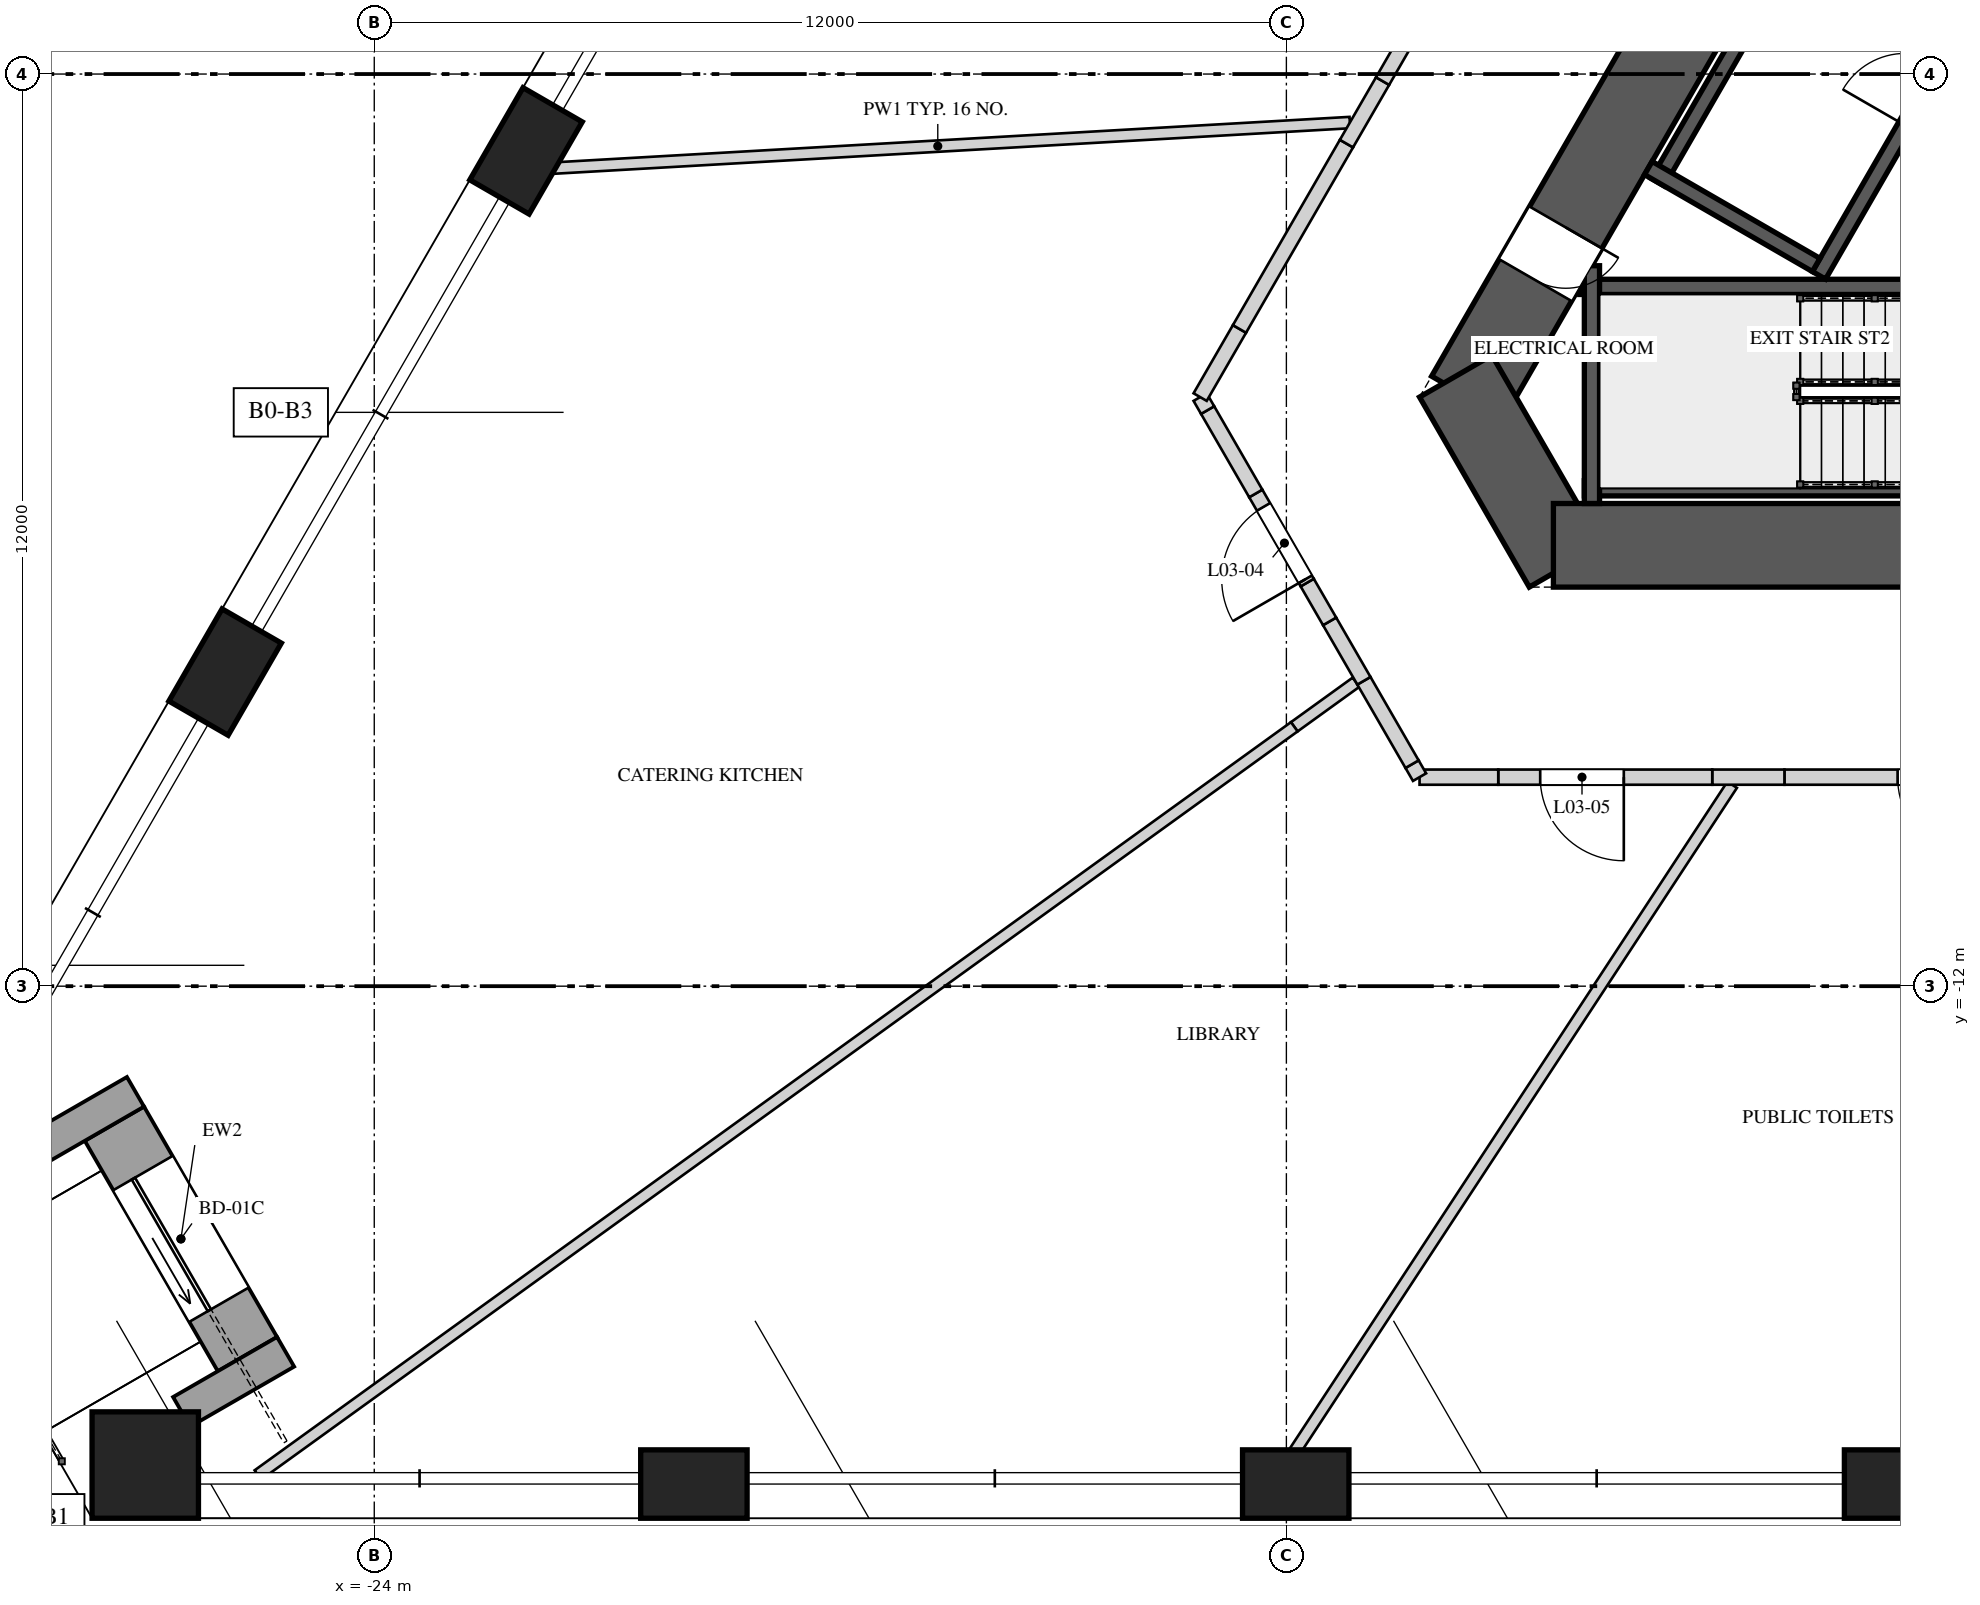
"""IFC4 building model, lengths in metres.
Left out: names, types, materials, properties, quantities, classifications, styles, units other than length and angle.
Written with IfcOpenShell. Run it as: python <this file> out.ifc"""

import sys

from ifc_helpers import new_model, si_unit, direction, frame, frame_2d, origin, origin_2d, place, context, subcontext, project, spatial, polyline, rectangle, outline, extrude, element, fill, save


model = new_model("IFC4")
c1 = context("Model", 3, precision=1e-05, world=origin(), true_north=direction((0.0, 1.0)))
c2 = subcontext(c1, "Body", "Model", "MODEL_VIEW")
j1 = project(units=[si_unit("LENGTHUNIT", "METRE"), si_unit("PLANEANGLEUNIT", "RADIAN")], contexts=[c1])
p1 = place(None, origin())
s1 = spatial("IfcSite", under=j1, at=p1, CompositionType="ELEMENT")
p2 = place(p1, origin())
s2 = spatial("IfcBuilding", under=s1, at=p2, CompositionType="ELEMENT")
p3 = place(p2, frame((0.0, 0.0, 20.0)))
s3 = spatial("IfcBuildingStorey", under=s2, at=p3, CompositionType="ELEMENT", Elevation=20.0)
p4 = place(p3, frame((-1.126, 10.45, 0.0), z_axis=(0.0, 0.0, 1.0), x_axis=(-0.500001757713, -0.866024388966, 0.0)))
e1 = element("IfcWall", 1, at=p4, inside=s3, PredefinedType="SHEAR", context=c2, shape_type="SweptSolid", body=[
    extrude(rectangle(XDim=16.974, YDim=1.1, at=frame_2d((8.487, 0.0))), origin(), (0.0, 0.0, 1.0), 5.0),
])
p5 = place(p4, frame((6.692, 0.0, 0.0)))
e2 = element("IfcOpeningElement", 2, at=p5, cuts=e1, PredefinedType="OPENING", context=c2, shape_type="SweptSolid", body=[
    extrude(rectangle(XDim=1.0, YDim=2.4, at=frame_2d((0.5, 1.2))), frame((0.0, 0.56, 0.0), z_axis=(0.0, -1.0, 0.0), x_axis=(1.0, 0.0, 0.0)), (0.0, 0.0, 1.0), 1.12),
])
p6 = place(p4, frame((14.397, 0.0, 0.0)))
e3 = element("IfcOpeningElement", 3, at=p6, cuts=e1, PredefinedType="OPENING", context=c2, shape_type="SweptSolid", body=[
    extrude(rectangle(XDim=0.8, YDim=2.1, at=frame_2d((0.4, 1.05))), frame((0.0, 0.56, 0.0), z_axis=(0.0, -1.0, 0.0), x_axis=(1.0, 0.0, 0.0)), (0.0, 0.0, 1.0), 1.12),
])
p7 = place(p3, frame((-9.772, -3.975, 0.0), z_axis=(0.0, 0.0, 1.0), x_axis=(0.499995765644, -0.866027848477, 0.0)))
e4 = element("IfcWall", 4, at=p7, inside=s3, PredefinedType="SHEAR", context=c2, shape_type="SweptSolid", body=[
    extrude(rectangle(XDim=2.887, YDim=1.1, at=frame_2d((1.443, 0.0))), origin(), (0.0, 0.0, 1.0), 5.0),
])
p8 = place(p3, frame((-8.487, -6.2, 0.0), z_axis=(0.0, 0.0, 1.0), x_axis=(1.0, 0.0, 0.0)))
e5 = element("IfcWall", 5, at=p8, inside=s3, PredefinedType="SHEAR", context=c2, shape_type="SweptSolid", body=[
    extrude(rectangle(XDim=16.974, YDim=1.1, at=frame_2d((8.487, 0.0))), origin(), (0.0, 0.0, 1.0), 5.0),
])
p9 = place(p8, frame((6.692, 0.0, 0.0)))
e6 = element("IfcOpeningElement", 6, at=p9, cuts=e5, PredefinedType="OPENING", context=c2, shape_type="SweptSolid", body=[
    extrude(rectangle(XDim=1.0, YDim=2.4, at=frame_2d((0.5, 1.2))), frame((0.0, 0.56, 0.0), z_axis=(0.0, -1.0, 0.0), x_axis=(1.0, 0.0, 0.0)), (0.0, 0.0, 1.0), 1.12),
])
for number, where, z_axis, x_axis in (
    (7, (-22.003, -1.011, 0.0), (0.0, 0.0, 1.0), (-0.5, -0.866, 0.0)),
    (8, (-25.962, -7.868, 0.0), (0.0, 0.0, 1.0), (-0.5, -0.866, 0.0)),
):
    element("IfcColumn", number, at=place(p3, frame(where, z_axis=z_axis, x_axis=x_axis)), inside=s3, PredefinedType="COLUMN", context=c2, shape_type="SweptSolid", body=[
        extrude(rectangle(XDim=1.4, YDim=0.9, at=origin_2d()), origin(), (0.0, 0.0, 1.0), 5.0),
    ])
p10 = place(p3, frame((-27.013, -18.3, 0.0), z_axis=(0.0, 0.0, 1.0), x_axis=(1.0, 0.0, 0.0)))
e9 = element("IfcColumn", 9, at=p10, inside=s3, PredefinedType="COLUMN", context=c2, shape_type="SweptSolid", body=[
    extrude(rectangle(XDim=1.4, YDim=1.4, at=origin_2d()), origin(), (0.0, 0.0, 1.0), 5.0),
])
for number, where, z_axis, x_axis in (
    (10, (-19.795, -18.55, 0.0), (0.0, 0.0, 1.0), (1.0, 0.0, 0.0)),
    (11, (-11.877, -18.55, 0.0), (0.0, 0.0, 1.0), (1.0, 0.0, 0.0)),
    (12, (-3.959, -18.55, 0.0), (0.0, 0.0, 1.0), (1.0, 0.0, 0.0)),
):
    element("IfcColumn", number, at=place(p3, frame(where, z_axis=z_axis, x_axis=x_axis)), inside=s3, PredefinedType="COLUMN", context=c2, shape_type="SweptSolid", body=[
        extrude(rectangle(XDim=1.4, YDim=0.9, at=origin_2d()), origin(), (0.0, 0.0, 1.0), 5.0),
    ])
p11 = place(p3, frame((-25.669, -16.841, 0.0), z_axis=(0.0, 0.0, 1.0), x_axis=(-0.500010275428, 0.866019471182, 0.0)))
e13 = element("IfcWall", 13, at=p11, inside=s3, PredefinedType="SOLIDWALL", context=c2, shape_type="SweptSolid", body=[
    extrude(rectangle(XDim=3.5, YDim=0.9, at=frame_2d((1.75, 0.0))), origin(), (0.0, 0.0, 1.0), 4.3),
])
p12 = place(p11, frame((0.75, 0.0, 0.0)))
e14 = element("IfcOpeningElement", 14, at=p12, cuts=e13, PredefinedType="OPENING", context=c2, shape_type="SweptSolid", body=[
    extrude(rectangle(XDim=2.0, YDim=2.4, at=frame_2d((1.0, 1.2))), frame((0.0, 0.46, 0.0), z_axis=(0.0, -1.0, 0.0), x_axis=(1.0, 0.0, 0.0)), (0.0, 0.0, 1.0), 0.92),
])
p13 = place(p3, frame((-26.534, -17.6, 0.0), z_axis=(0.0, 0.0, 1.0), x_axis=(0.86597962928, 0.500079275387, 0.0)))
e15 = element("IfcWall", 15, at=p13, inside=s3, PredefinedType="SOLIDWALL", context=c2, shape_type="SweptSolid", body=[
    extrude(rectangle(XDim=1.579, YDim=0.45, at=frame_2d((0.79, 0.0))), origin(), (0.0, 0.0, 1.0), 2.55),
])
p14 = place(p3, frame((-28.509, -14.179, 0.0), z_axis=(0.0, 0.0, 1.0), x_axis=(0.866046570609, 0.499963336192, 0.0)))
e16 = element("IfcWall", 16, at=p14, inside=s3, PredefinedType="SOLIDWALL", context=c2, shape_type="SweptSolid", body=[
    extrude(rectangle(XDim=1.579, YDim=0.45, at=frame_2d((0.79, 0.0))), origin(), (0.0, 0.0, 1.0), 2.55),
])
p15 = place(p3, frame((-8.08, -5.45, 0.0), z_axis=(0.0, 0.0, 1.0), x_axis=(1.0, 0.0, 0.0)))
e17 = element("IfcWall", 17, at=p15, inside=s3, PredefinedType="SOLIDWALL", context=c2, shape_type="SweptSolid", body=[
    extrude(rectangle(XDim=6.2, YDim=0.2, at=frame_2d((3.1, 0.0))), origin(), (0.0, 0.0, 1.0), 4.65),
])
p16 = place(p3, frame((-8.141, -2.8, 0.0), z_axis=(0.0, 0.0, 1.0), x_axis=(1.0, 0.0, 0.0)))
e18 = element("IfcWall", 18, at=p16, inside=s3, PredefinedType="SOLIDWALL", context=c2, shape_type="SweptSolid", body=[
    extrude(rectangle(XDim=6.261, YDim=0.2, at=frame_2d((3.13, 0.0))), origin(), (0.0, 0.0, 1.0), 4.65),
])
p17 = place(p3, frame((-7.98, -2.522, 0.0), z_axis=(0.0, 0.0, 1.0), x_axis=(0.0, -1.0, 0.0)))
e19 = element("IfcWall", 19, at=p17, inside=s3, PredefinedType="SOLIDWALL", context=c2, shape_type="SweptSolid", body=[
    extrude(rectangle(XDim=3.128, YDim=0.2, at=frame_2d((1.564, 0.0))), origin(), (0.0, 0.0, 1.0), 4.65),
])
p18 = place(p3, frame((-4.993, -2.648, 0.0), z_axis=(0.0, 0.0, 1.0), x_axis=(0.499996545922, 0.866027397988, 0.0)))
e20 = element("IfcWall", 20, at=p18, inside=s3, PredefinedType="SOLIDWALL", context=c2, shape_type="SweptSolid", body=[
    extrude(rectangle(XDim=5.5, YDim=0.2, at=frame_2d((2.75, 0.0))), origin(), (0.0, 0.0, 1.0), 4.65),
])
p19 = place(p18, frame((2.275, 0.0, 0.0)))
e21 = element("IfcOpeningElement", 21, at=p19, cuts=e20, PredefinedType="OPENING", context=c2, shape_type="SweptSolid", body=[
    extrude(rectangle(XDim=0.95, YDim=2.4, at=frame_2d((0.475, 1.2))), frame((0.0, 0.11, 0.0), z_axis=(0.0, -1.0, 0.0), x_axis=(1.0, 0.0, 0.0)), (0.0, 0.0, 1.0), 0.22),
])
p20 = place(p3, frame((-4.365, 3.34, 0.0), z_axis=(0.0, 0.0, 1.0), x_axis=(-0.499996545922, -0.866027397988, 0.0)))
e22 = element("IfcWall", 22, at=p20, inside=s3, PredefinedType="SOLIDWALL", context=c2, shape_type="SweptSolid", body=[
    extrude(rectangle(XDim=5.5, YDim=0.2, at=frame_2d((2.75, 0.0))), origin(), (0.0, 0.0, 1.0), 4.65),
])
p21 = place(p3, frame((-5.03, -2.512, 0.0), z_axis=(0.0, 0.0, 1.0), x_axis=(-0.865989465428, 0.500062241894, 0.0)))
e23 = element("IfcWall", 23, at=p21, inside=s3, PredefinedType="SOLIDWALL", context=c2, shape_type="SweptSolid", body=[
    extrude(rectangle(XDim=2.55, YDim=0.2, at=frame_2d((1.275, 0.0))), origin(), (0.0, 0.0, 1.0), 4.65),
])
p22 = place(p3, frame((-11.165, -0.638, 0.0), z_axis=(0.0, 0.0, 1.0), x_axis=(-0.998369760977, -0.057077319203, 0.0)))
e24 = element("IfcWall", 24, at=p22, inside=s3, PredefinedType="PARTITIONING", context=c2, shape_type="SweptSolid", body=[
    extrude(rectangle(XDim=10.86, YDim=0.15, at=frame_2d((5.43, 0.0))), origin(), (0.0, 0.0, 1.0), 3.75),
])
p23 = place(p3, frame((-11.084, -8.001, 0.0), z_axis=(0.0, 0.0, 1.0), x_axis=(-0.810724232581, -0.585428235316, 0.0)))
e25 = element("IfcWall", 25, at=p23, inside=s3, PredefinedType="PARTITIONING", context=c2, shape_type="SweptSolid", body=[
    extrude(rectangle(XDim=1.001, YDim=0.15, at=frame_2d((0.5, 0.0))), origin(), (0.0, 0.0, 1.0), 3.55),
])
p24 = place(p3, frame((-11.896, -8.588, 0.0), z_axis=(0.0, 0.0, 1.0), x_axis=(-0.810816646236, -0.585300235936, 0.0)))
e26 = element("IfcWall", 26, at=p24, inside=s3, PredefinedType="PARTITIONING", context=c2, shape_type="SweptSolid", body=[
    extrude(rectangle(XDim=16.816, YDim=0.15, at=frame_2d((8.408, 0.0))), origin(), (0.0, 0.0, 1.0), 4.65),
])
p25 = place(p3, frame((-6.135, -9.35, 0.0), z_axis=(0.0, 0.0, 1.0), x_axis=(-0.548631398355, -0.836064344856, 0.0)))
e27 = element("IfcWall", 27, at=p25, inside=s3, PredefinedType="PARTITIONING", context=c2, shape_type="SweptSolid", body=[
    extrude(rectangle(XDim=10.86, YDim=0.15, at=frame_2d((5.43, 0.0))), origin(), (0.0, 0.0, 1.0), 3.75),
])
p26 = place(p3, frame((-2.383, -9.25, 0.0), z_axis=(0.0, 0.0, 1.0), x_axis=(-1.0, 0.0, 0.0)))
e28 = element("IfcWall", 28, at=p26, inside=s3, PredefinedType="SOLIDWALL", context=c2, shape_type="SweptSolid", body=[
    extrude(rectangle(XDim=3.064, YDim=0.2, at=frame_2d((1.532, 0.0))), origin(), (0.0, 0.0, 1.0), 4.65),
])
p27 = place(p26, frame((0.475, 0.0, 0.0)))
e29 = element("IfcOpeningElement", 29, at=p27, cuts=e28, PredefinedType="OPENING", context=c2, shape_type="SweptSolid", body=[
    extrude(rectangle(XDim=1.1, YDim=2.4, at=frame_2d((0.55, 1.2))), frame((0.0, 0.11, 0.0), z_axis=(0.0, -1.0, 0.0), x_axis=(1.0, 0.0, 0.0)), (0.0, 0.0, 1.0), 0.22),
])
p28 = place(p3, frame((-5.448, -9.25, 0.0), z_axis=(0.0, 0.0, 1.0), x_axis=(-1.0, 0.0, 0.0)))
e30 = element("IfcWall", 30, at=p28, inside=s3, PredefinedType="SOLIDWALL", context=c2, shape_type="SweptSolid", body=[
    extrude(rectangle(XDim=0.95, YDim=0.2, at=frame_2d((0.475, 0.0))), origin(), (0.0, 0.0, 1.0), 3.75),
])
p29 = place(p3, frame((-6.397, -9.25, 0.0), z_axis=(0.0, 0.0, 1.0), x_axis=(-1.0, 0.0, 0.0)))
e31 = element("IfcWall", 31, at=p29, inside=s3, PredefinedType="SOLIDWALL", context=c2, shape_type="SweptSolid", body=[
    extrude(rectangle(XDim=2.815, YDim=0.2, at=frame_2d((1.408, 0.0))), origin(), (0.0, 0.0, 1.0), 4.65),
])
p30 = place(p29, frame((1.163, 0.0, 0.0)))
e32 = element("IfcOpeningElement", 32, at=p30, cuts=e31, PredefinedType="OPENING", context=c2, shape_type="SweptSolid", body=[
    extrude(rectangle(XDim=1.1, YDim=2.4, at=frame_2d((0.55, 1.2))), frame((0.0, 0.11, 0.0), z_axis=(0.0, -1.0, 0.0), x_axis=(1.0, 0.0, 0.0)), (0.0, 0.0, 1.0), 0.22),
])
p31 = place(p3, frame((-9.213, -9.25, 0.0), z_axis=(0.0, 0.0, 1.0), x_axis=(-1.0, 0.0, 0.0)))
e33 = element("IfcWall", 33, at=p31, inside=s3, PredefinedType="SOLIDWALL", context=c2, shape_type="SweptSolid", body=[
    extrude(rectangle(XDim=1.035, YDim=0.2, at=frame_2d((0.518, 0.0))), origin(), (0.0, 0.0, 1.0), 3.55),
])
p32 = place(p3, frame((-10.248, -9.25, 0.0), z_axis=(0.0, 0.0, 1.0), x_axis=(-0.499865263774, 0.866103179807, 0.0)))
e34 = element("IfcWall", 34, at=p32, inside=s3, PredefinedType="SOLIDWALL", context=c2, shape_type="SweptSolid", body=[
    extrude(rectangle(XDim=0.197, YDim=0.2, at=frame_2d((0.099, 0.0))), origin(), (0.0, 0.0, 1.0), 3.55),
])
p33 = place(p3, frame((-10.347, -9.079, 0.0), z_axis=(0.0, 0.0, 1.0), x_axis=(-0.499911523785, 0.866076479525, 0.0)))
e35 = element("IfcWall", 35, at=p33, inside=s3, PredefinedType="SOLIDWALL", context=c2, shape_type="SweptSolid", body=[
    extrude(rectangle(XDim=1.267, YDim=0.2, at=frame_2d((0.633, 0.0))), origin(), (0.0, 0.0, 1.0), 4.65),
])
p34 = place(p3, frame((-10.98, -7.982, 0.0), z_axis=(0.0, 0.0, 1.0), x_axis=(-0.500097243556, 0.865969252911, 0.0)))
e36 = element("IfcWall", 36, at=p34, inside=s3, PredefinedType="SOLIDWALL", context=c2, shape_type="SweptSolid", body=[
    extrude(rectangle(XDim=0.902, YDim=0.2, at=frame_2d((0.451, 0.0))), origin(), (0.0, 0.0, 1.0), 3.55),
])
p35 = place(p3, frame((-11.431, -7.201, 0.0), z_axis=(0.0, 0.0, 1.0), x_axis=(-0.500105011351, 0.865964766963, 0.0)))
e37 = element("IfcWall", 37, at=p35, inside=s3, PredefinedType="SOLIDWALL", context=c2, shape_type="SweptSolid", body=[
    extrude(rectangle(XDim=0.589, YDim=0.2, at=frame_2d((0.294, 0.0))), origin(), (0.0, 0.0, 1.0), 4.65),
])
p36 = place(p3, frame((-11.726, -6.69, 0.0), z_axis=(0.0, 0.0, 1.0), x_axis=(-0.499941024108, 0.866059450854, 0.0)))
e38 = element("IfcWall", 38, at=p36, inside=s3, PredefinedType="SOLIDWALL", context=c2, shape_type="SweptSolid", body=[
    extrude(outline(polyline([(0.0, 0.0), (1.354, 0.0), (1.354, 3.55), (0.451, 3.55), (0.451, 4.65), (0.0, 4.65), (0.0, 0.0)])), frame((0.0, 0.1, 0.0), z_axis=(0.0, -1.0, 0.0), x_axis=(1.0, 0.0, 0.0)), (0.0, 0.0, 1.0), 0.2),
])
p37 = place(p36, frame((0.05, 0.0, 0.0)))
e39 = element("IfcOpeningElement", 39, at=p37, cuts=e38, PredefinedType="OPENING", context=c2, shape_type="SweptSolid", body=[
    extrude(rectangle(XDim=1.1, YDim=2.4, at=frame_2d((0.55, 1.2))), frame((0.0, 0.11, 0.0), z_axis=(0.0, -1.0, 0.0), x_axis=(1.0, 0.0, 0.0)), (0.0, 0.0, 1.0), 0.22),
])
p38 = place(p3, frame((-12.403, -5.518, 0.0), z_axis=(0.0, 0.0, 1.0), x_axis=(-0.500056058743, 0.865993035835, 0.0)))
e40 = element("IfcWall", 40, at=p38, inside=s3, PredefinedType="SOLIDWALL", context=c2, shape_type="SweptSolid", body=[
    extrude(rectangle(XDim=1.267, YDim=0.2, at=frame_2d((0.633, 0.0))), origin(), (0.0, 0.0, 1.0), 4.65),
])
p39 = place(p3, frame((-13.036, -4.421, 0.0), z_axis=(0.0, 0.0, 1.0), x_axis=(-0.499865263774, 0.866103179807, 0.0)))
e41 = element("IfcWall", 41, at=p39, inside=s3, PredefinedType="SOLIDWALL", context=c2, shape_type="SweptSolid", body=[
    extrude(rectangle(XDim=0.197, YDim=0.2, at=frame_2d((0.099, 0.0))), origin(), (0.0, 0.0, 1.0), 3.55),
])
p40 = place(p3, frame((-13.135, -4.25, 0.0), z_axis=(0.0, 0.0, 1.0), x_axis=(0.500171514983, 0.865926356915, 0.0)))
e42 = element("IfcWall", 42, at=p40, inside=s3, PredefinedType="SOLIDWALL", context=c2, shape_type="SweptSolid", body=[
    extrude(rectangle(XDim=1.035, YDim=0.2, at=frame_2d((0.518, 0.0))), origin(), (0.0, 0.0, 1.0), 3.55),
])
p41 = place(p3, frame((-12.617, -3.354, 0.0), z_axis=(0.0, 0.0, 1.0), x_axis=(0.49993514545, 0.866062844338, 0.0)))
e43 = element("IfcWall", 43, at=p41, inside=s3, PredefinedType="SOLIDWALL", context=c2, shape_type="SweptSolid", body=[
    extrude(rectangle(XDim=2.815, YDim=0.2, at=frame_2d((1.408, 0.0))), origin(), (0.0, 0.0, 1.0), 4.65),
])
p42 = place(p3, frame((-11.209, -0.915, 0.0), z_axis=(0.0, 0.0, 1.0), x_axis=(0.500174821557, 0.865924446982, 0.0)))
e44 = element("IfcWall", 44, at=p42, inside=s3, PredefinedType="SOLIDWALL", context=c2, shape_type="SweptSolid", body=[
    extrude(rectangle(XDim=0.95, YDim=0.2, at=frame_2d((0.475, 0.0))), origin(), (0.0, 0.0, 1.0), 3.75),
])
p43 = place(p3, frame((-10.734, -0.093, 0.0), z_axis=(0.0, 0.0, 1.0), x_axis=(0.499952348839, 0.866052913447, 0.0)))
e45 = element("IfcWall", 45, at=p43, inside=s3, PredefinedType="SOLIDWALL", context=c2, shape_type="SweptSolid", body=[
    extrude(rectangle(XDim=3.064, YDim=0.2, at=frame_2d((1.532, 0.0))), origin(), (0.0, 0.0, 1.0), 4.65),
])
p44 = place(p43, frame((1.489, 0.0, 0.0)))
e46 = element("IfcOpeningElement", 46, at=p44, cuts=e45, PredefinedType="OPENING", context=c2, shape_type="SweptSolid", body=[
    extrude(rectangle(XDim=1.1, YDim=2.4, at=frame_2d((0.55, 1.2))), frame((0.0, 0.11, 0.0), z_axis=(0.0, -1.0, 0.0), x_axis=(1.0, 0.0, 0.0)), (0.0, 0.0, 1.0), 0.22),
])
p45 = place(p12, origin())
e47 = element("IfcDoor", 47, at=p45, inside=s3, OperationType="SLIDING_TO_LEFT", PredefinedType="DOOR", context=c2, shape_type="SweptSolid", body=[
    extrude(rectangle(XDim=2.0, YDim=2.4, at=frame_2d((1.0, 1.2))), frame((0.0, 0.025, 0.0), z_axis=(0.0, -1.0, 0.0), x_axis=(1.0, 0.0, 0.0)), (0.0, 0.0, 1.0), 0.05),
])
fill(e14, e47)
p46 = place(p6, origin())
e48 = element("IfcDoor", 48, at=p46, inside=s3, OperationType="SINGLE_SWING_RIGHT", PredefinedType="DOOR", context=c2, shape_type="SweptSolid", body=[
    extrude(rectangle(XDim=0.8, YDim=2.1, at=frame_2d((0.4, 1.05))), frame((0.0, 0.025, 0.0), z_axis=(0.0, -1.0, 0.0), x_axis=(1.0, 0.0, 0.0)), (0.0, 0.0, 1.0), 0.05),
])
fill(e3, e48)
p47 = place(p37, origin())
e49 = element("IfcDoor", 49, at=p47, inside=s3, OperationType="SINGLE_SWING_RIGHT", PredefinedType="DOOR", context=c2, shape_type="SweptSolid", body=[
    extrude(rectangle(XDim=1.1, YDim=2.4, at=frame_2d((0.55, 1.2))), frame((0.0, 0.025, 0.0), z_axis=(0.0, -1.0, 0.0), x_axis=(1.0, 0.0, 0.0)), (0.0, 0.0, 1.0), 0.05),
])
fill(e39, e49)
p48 = place(p30, origin())
e50 = element("IfcDoor", 50, at=p48, inside=s3, OperationType="SINGLE_SWING_LEFT", PredefinedType="DOOR", context=c2, shape_type="SweptSolid", body=[
    extrude(rectangle(XDim=1.1, YDim=2.4, at=frame_2d((0.55, 1.2))), frame((0.0, 0.025, 0.0), z_axis=(0.0, -1.0, 0.0), x_axis=(1.0, 0.0, 0.0)), (0.0, 0.0, 1.0), 0.05),
])
fill(e32, e50)
p49 = place(p27, origin())
e51 = element("IfcDoor", 51, at=p49, inside=s3, OperationType="SINGLE_SWING_RIGHT", PredefinedType="DOOR", context=c2, shape_type="SweptSolid", body=[
    extrude(rectangle(XDim=1.1, YDim=2.4, at=frame_2d((0.55, 1.2))), frame((0.0, 0.025, 0.0), z_axis=(0.0, -1.0, 0.0), x_axis=(1.0, 0.0, 0.0)), (0.0, 0.0, 1.0), 0.05),
])
fill(e29, e51)
save(model, sys.argv[1])
